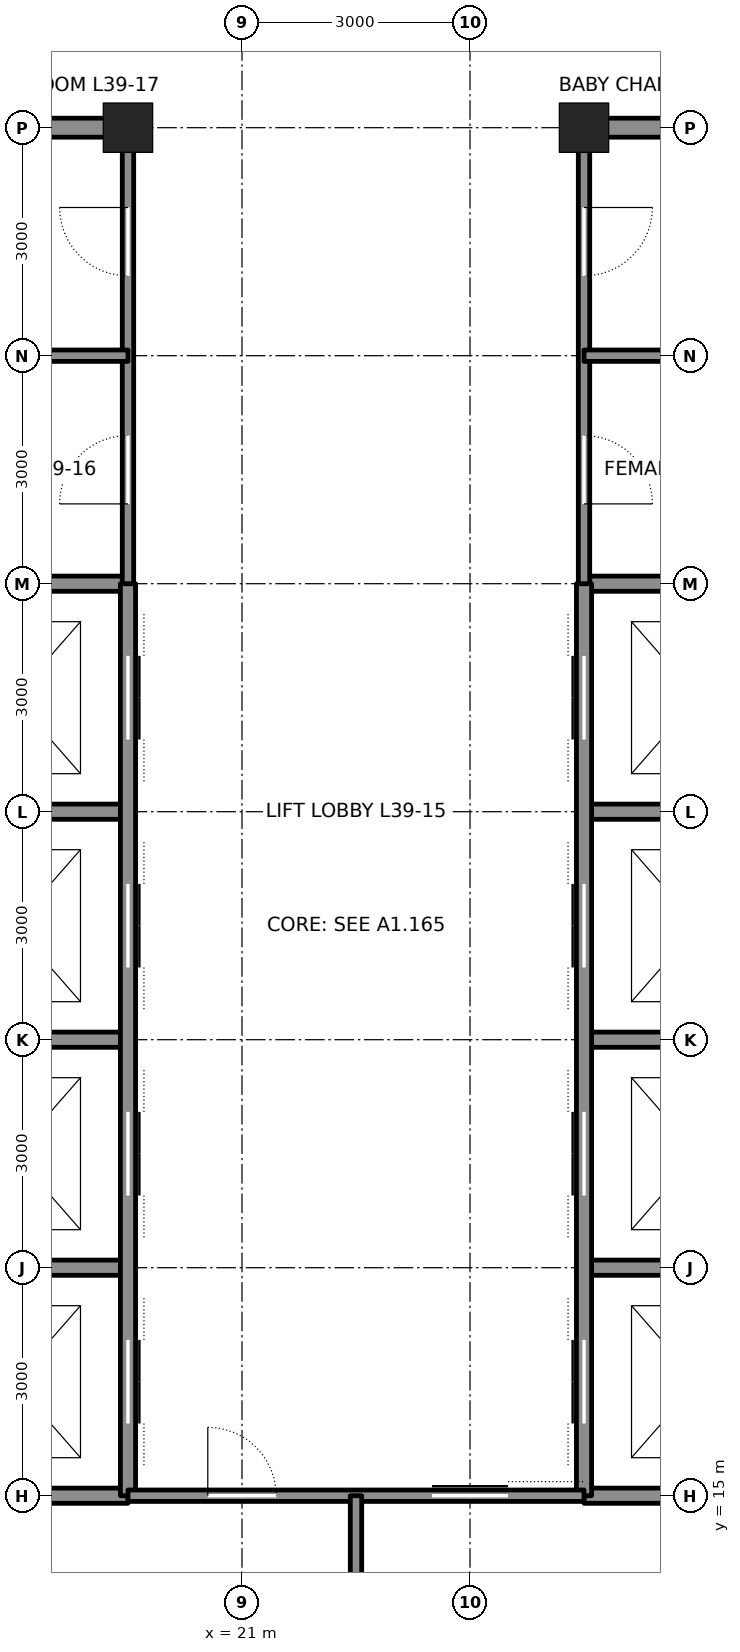
"""IFC4 building model, lengths in metres.
Left out: names, types, materials, properties, quantities, classifications, styles, units other than length and angle.
Written with IfcOpenShell. Run it as: python <this file> out.ifc"""

import sys

from ifc_helpers import new_model, si_unit, direction, frame, frame_2d, origin, origin_2d, place, context, subcontext, project, spatial, rectangle, hollow_rectangle, extrude, element, fill, save


model = new_model("IFC4")
c1 = context("Model", 3, precision=1e-05, world=origin(), true_north=direction((0.0, 1.0)))
c2 = subcontext(c1, "Body", "Model", "MODEL_VIEW")
j1 = project(units=[si_unit("LENGTHUNIT", "METRE"), si_unit("PLANEANGLEUNIT", "RADIAN")], contexts=[c1])
p1 = place(None, origin())
s1 = spatial("IfcSite", under=j1, at=p1, CompositionType="ELEMENT")
p2 = place(p1, origin())
s2 = spatial("IfcBuilding", under=s1, at=p2, CompositionType="ELEMENT")
p3 = place(p2, frame((0.0, 0.0, 180.0)))
s3 = spatial("IfcBuildingStorey", under=s2, at=p3, CompositionType="ELEMENT", Elevation=180.0)
for number, where, z_axis, x_axis in (
    (1, (19.5, 33.0, 0.0), (0.0, 0.0, 1.0), (1.0, 0.0, 0.0)),
    (2, (25.5, 33.0, 0.0), (0.0, 0.0, 1.0), (1.0, 0.0, 0.0)),
):
    element("IfcColumn", number, at=place(p3, frame(where, z_axis=z_axis, x_axis=x_axis)), inside=s3, PredefinedType="COLUMN", context=c2, shape_type="SweptSolid", body=[
        extrude(hollow_rectangle(XDim=0.65, YDim=0.65, WallThickness=0.065, at=origin_2d()), origin(), (0.0, 0.0, 1.0), 4.5),
    ])
for number, where, z_axis, x_axis in (
    (3, (12.0, 15.0, 0.0), (0.0, 0.0, 1.0), (1.0, 0.0, 0.0)),
    (4, (25.5, 15.0, 0.0), (0.0, 0.0, 1.0), (1.0, 0.0, 0.0)),
):
    element("IfcWall", number, at=place(p3, frame(where, z_axis=z_axis, x_axis=x_axis)), inside=s3, PredefinedType="SOLIDWALL", context=c2, shape_type="SweptSolid", body=[
        extrude(rectangle(XDim=7.5, YDim=0.2, at=frame_2d((3.75, 0.0))), origin(), (0.0, 0.0, 1.0), 4.34),
    ])
for number, where, z_axis, x_axis in (
    (5, (16.75, 24.0, 0.0), (0.0, 0.0, 1.0), (1.0, 0.0, 0.0)),
    (6, (25.5, 24.0, 0.0), (0.0, 0.0, 1.0), (1.0, 0.0, 0.0)),
):
    element("IfcWall", number, at=place(p3, frame(where, z_axis=z_axis, x_axis=x_axis)), inside=s3, PredefinedType="SOLIDWALL", context=c2, shape_type="SweptSolid", body=[
        extrude(rectangle(XDim=2.75, YDim=0.2, at=frame_2d((1.375, 0.0))), origin(), (0.0, 0.0, 1.0), 3.39),
    ])
p4 = place(p3, frame((12.0, 27.0, 0.0), z_axis=(0.0, 0.0, 1.0), x_axis=(1.0, 0.0, 0.0)))
e7 = element("IfcWall", 7, at=p4, inside=s3, PredefinedType="SOLIDWALL", context=c2, shape_type="SweptSolid", body=[
    extrude(rectangle(XDim=7.5, YDim=0.2, at=frame_2d((3.75, 0.0))), origin(), (0.0, 0.0, 1.0), 4.34),
])
p5 = place(p4, frame((1.65, 0.0, 0.0)))
e8 = element("IfcOpeningElement", 8, at=p5, cuts=e7, PredefinedType="OPENING", context=c2, shape_type="SweptSolid", body=[
    extrude(rectangle(XDim=1.2, YDim=2.1, at=frame_2d((0.6, 1.05))), frame((0.0, 0.11, 0.0), z_axis=(0.0, -1.0, 0.0), x_axis=(1.0, 0.0, 0.0)), (0.0, 0.0, 1.0), 0.22),
])
p6 = place(p3, frame((25.5, 27.0, 0.0), z_axis=(0.0, 0.0, 1.0), x_axis=(1.0, 0.0, 0.0)))
e9 = element("IfcWall", 9, at=p6, inside=s3, PredefinedType="SOLIDWALL", context=c2, shape_type="SweptSolid", body=[
    extrude(rectangle(XDim=3.0, YDim=0.2, at=frame_2d((1.5, 0.0))), origin(), (0.0, 0.0, 1.0), 4.34),
])
for number, where, z_axis, x_axis in (
    (10, (16.75, 33.0, 0.0), (0.0, 0.0, 1.0), (1.0, 0.0, 0.0)),
    (11, (25.75, 33.0, 0.0), (0.0, 0.0, 1.0), (1.0, 0.0, 0.0)),
):
    element("IfcWall", number, at=place(p3, frame(where, z_axis=z_axis, x_axis=x_axis)), inside=s3, PredefinedType="SOLIDWALL", context=c2, shape_type="SweptSolid", body=[
        extrude(rectangle(XDim=2.5, YDim=0.25, at=frame_2d((1.25, 0.0))), origin(), (0.0, 0.0, 1.0), 3.481),
    ])
p7 = place(p3, frame((16.5, 18.0, 0.0), z_axis=(0.0, 0.0, 1.0), x_axis=(1.0, 0.0, 0.0)))
e12 = element("IfcWall", 12, at=p7, inside=s3, PredefinedType="SOLIDWALL", context=c2, shape_type="SweptSolid", body=[
    extrude(rectangle(XDim=3.0, YDim=0.2, at=frame_2d((1.5, 0.0))), origin(), (0.0, 0.0, 1.0), 4.34),
])
p8 = place(p3, frame((25.5, 18.0, 0.0), z_axis=(0.0, 0.0, 1.0), x_axis=(1.0, 0.0, 0.0)))
e13 = element("IfcWall", 13, at=p8, inside=s3, PredefinedType="SOLIDWALL", context=c2, shape_type="SweptSolid", body=[
    extrude(rectangle(XDim=7.5, YDim=0.2, at=frame_2d((3.75, 0.0))), origin(), (0.0, 0.0, 1.0), 4.34),
])
p9 = place(p8, frame((4.65, 0.0, 0.0)))
e14 = element("IfcOpeningElement", 14, at=p9, cuts=e13, PredefinedType="OPENING", context=c2, shape_type="SweptSolid", body=[
    extrude(rectangle(XDim=1.2, YDim=2.1, at=frame_2d((0.6, 1.05))), frame((0.0, 0.11, 0.0), z_axis=(0.0, -1.0, 0.0), x_axis=(1.0, 0.0, 0.0)), (0.0, 0.0, 1.0), 0.22),
])
for number, where, z_axis, x_axis in (
    (15, (16.75, 21.0, 0.0), (0.0, 0.0, 1.0), (1.0, 0.0, 0.0)),
    (16, (25.5, 21.0, 0.0), (0.0, 0.0, 1.0), (1.0, 0.0, 0.0)),
):
    element("IfcWall", number, at=place(p3, frame(where, z_axis=z_axis, x_axis=x_axis)), inside=s3, PredefinedType="SOLIDWALL", context=c2, shape_type="SweptSolid", body=[
        extrude(rectangle(XDim=2.75, YDim=0.2, at=frame_2d((1.375, 0.0))), origin(), (0.0, 0.0, 1.0), 3.39),
    ])
p10 = place(p3, frame((19.5, 15.0, 0.0), z_axis=(0.0, 0.0, 1.0), x_axis=(0.0, 1.0, 0.0)))
e17 = element("IfcWall", 17, at=p10, inside=s3, PredefinedType="SOLIDWALL", context=c2, shape_type="SweptSolid", body=[
    extrude(rectangle(XDim=12.0, YDim=0.2, at=frame_2d((6.0, 0.0))), origin(), (0.0, 0.0, 1.0), 3.365),
])
p11 = place(p10, frame((0.95, 0.0, 0.0)))
e18 = element("IfcOpeningElement", 18, at=p11, cuts=e17, PredefinedType="OPENING", context=c2, shape_type="SweptSolid", body=[
    extrude(rectangle(XDim=1.1, YDim=2.1, at=frame_2d((0.55, 1.05))), frame((0.0, 0.11, 0.0), z_axis=(0.0, -1.0, 0.0), x_axis=(1.0, 0.0, 0.0)), (0.0, 0.0, 1.0), 0.22),
])
p12 = place(p10, frame((3.95, 0.0, 0.0)))
e19 = element("IfcOpeningElement", 19, at=p12, cuts=e17, PredefinedType="OPENING", context=c2, shape_type="SweptSolid", body=[
    extrude(rectangle(XDim=1.1, YDim=2.1, at=frame_2d((0.55, 1.05))), frame((0.0, 0.11, 0.0), z_axis=(0.0, -1.0, 0.0), x_axis=(1.0, 0.0, 0.0)), (0.0, 0.0, 1.0), 0.22),
])
p13 = place(p10, frame((6.95, 0.0, 0.0)))
e20 = element("IfcOpeningElement", 20, at=p13, cuts=e17, PredefinedType="OPENING", context=c2, shape_type="SweptSolid", body=[
    extrude(rectangle(XDim=1.1, YDim=2.1, at=frame_2d((0.55, 1.05))), frame((0.0, 0.11, 0.0), z_axis=(0.0, -1.0, 0.0), x_axis=(1.0, 0.0, 0.0)), (0.0, 0.0, 1.0), 0.22),
])
p14 = place(p10, frame((9.95, 0.0, 0.0)))
e21 = element("IfcOpeningElement", 21, at=p14, cuts=e17, PredefinedType="OPENING", context=c2, shape_type="SweptSolid", body=[
    extrude(rectangle(XDim=1.1, YDim=2.1, at=frame_2d((0.55, 1.05))), frame((0.0, 0.11, 0.0), z_axis=(0.0, -1.0, 0.0), x_axis=(1.0, 0.0, 0.0)), (0.0, 0.0, 1.0), 0.22),
])
p15 = place(p3, frame((19.5, 27.0, 0.0), z_axis=(0.0, 0.0, 1.0), x_axis=(0.0, 1.0, 0.0)))
e22 = element("IfcWall", 22, at=p15, inside=s3, PredefinedType="PARTITIONING", context=c2, shape_type="SweptSolid", body=[
    extrude(rectangle(XDim=5.75, YDim=0.15, at=frame_2d((2.875, 0.0))), origin(), (0.0, 0.0, 1.0), 3.365),
])
p16 = place(p15, frame((1.05, 0.0, 0.0)))
e23 = element("IfcOpeningElement", 23, at=p16, cuts=e22, PredefinedType="OPENING", context=c2, shape_type="SweptSolid", body=[
    extrude(rectangle(XDim=0.9, YDim=2.1, at=frame_2d((0.45, 1.05))), frame((0.0, 0.085, 0.0), z_axis=(0.0, -1.0, 0.0), x_axis=(1.0, 0.0, 0.0)), (0.0, 0.0, 1.0), 0.17),
])
p17 = place(p15, frame((4.05, 0.0, 0.0)))
e24 = element("IfcOpeningElement", 24, at=p17, cuts=e22, PredefinedType="OPENING", context=c2, shape_type="SweptSolid", body=[
    extrude(rectangle(XDim=0.9, YDim=2.1, at=frame_2d((0.45, 1.05))), frame((0.0, 0.085, 0.0), z_axis=(0.0, -1.0, 0.0), x_axis=(1.0, 0.0, 0.0)), (0.0, 0.0, 1.0), 0.17),
])
p18 = place(p3, frame((25.5, 15.0, 0.0), z_axis=(0.0, 0.0, 1.0), x_axis=(0.0, 1.0, 0.0)))
e25 = element("IfcWall", 25, at=p18, inside=s3, PredefinedType="SOLIDWALL", context=c2, shape_type="SweptSolid", body=[
    extrude(rectangle(XDim=12.0, YDim=0.2, at=frame_2d((6.0, 0.0))), origin(), (0.0, 0.0, 1.0), 3.365),
])
p19 = place(p18, frame((0.95, 0.0, 0.0)))
e26 = element("IfcOpeningElement", 26, at=p19, cuts=e25, PredefinedType="OPENING", context=c2, shape_type="SweptSolid", body=[
    extrude(rectangle(XDim=1.1, YDim=2.1, at=frame_2d((0.55, 1.05))), frame((0.0, 0.11, 0.0), z_axis=(0.0, -1.0, 0.0), x_axis=(1.0, 0.0, 0.0)), (0.0, 0.0, 1.0), 0.22),
])
p20 = place(p18, frame((3.95, 0.0, 0.0)))
e27 = element("IfcOpeningElement", 27, at=p20, cuts=e25, PredefinedType="OPENING", context=c2, shape_type="SweptSolid", body=[
    extrude(rectangle(XDim=1.1, YDim=2.1, at=frame_2d((0.55, 1.05))), frame((0.0, 0.11, 0.0), z_axis=(0.0, -1.0, 0.0), x_axis=(1.0, 0.0, 0.0)), (0.0, 0.0, 1.0), 0.22),
])
p21 = place(p18, frame((6.95, 0.0, 0.0)))
e28 = element("IfcOpeningElement", 28, at=p21, cuts=e25, PredefinedType="OPENING", context=c2, shape_type="SweptSolid", body=[
    extrude(rectangle(XDim=1.1, YDim=2.1, at=frame_2d((0.55, 1.05))), frame((0.0, 0.11, 0.0), z_axis=(0.0, -1.0, 0.0), x_axis=(1.0, 0.0, 0.0)), (0.0, 0.0, 1.0), 0.22),
])
p22 = place(p18, frame((9.95, 0.0, 0.0)))
e29 = element("IfcOpeningElement", 29, at=p22, cuts=e25, PredefinedType="OPENING", context=c2, shape_type="SweptSolid", body=[
    extrude(rectangle(XDim=1.1, YDim=2.1, at=frame_2d((0.55, 1.05))), frame((0.0, 0.11, 0.0), z_axis=(0.0, -1.0, 0.0), x_axis=(1.0, 0.0, 0.0)), (0.0, 0.0, 1.0), 0.22),
])
p23 = place(p3, frame((25.5, 27.0, 0.0), z_axis=(0.0, 0.0, 1.0), x_axis=(0.0, 1.0, 0.0)))
e30 = element("IfcWall", 30, at=p23, inside=s3, PredefinedType="PARTITIONING", context=c2, shape_type="SweptSolid", body=[
    extrude(rectangle(XDim=5.75, YDim=0.15, at=frame_2d((2.875, 0.0))), origin(), (0.0, 0.0, 1.0), 3.365),
])
p24 = place(p23, frame((1.05, 0.0, 0.0)))
e31 = element("IfcOpeningElement", 31, at=p24, cuts=e30, PredefinedType="OPENING", context=c2, shape_type="SweptSolid", body=[
    extrude(rectangle(XDim=0.9, YDim=2.1, at=frame_2d((0.45, 1.05))), frame((0.0, 0.085, 0.0), z_axis=(0.0, -1.0, 0.0), x_axis=(1.0, 0.0, 0.0)), (0.0, 0.0, 1.0), 0.17),
])
p25 = place(p23, frame((4.05, 0.0, 0.0)))
e32 = element("IfcOpeningElement", 32, at=p25, cuts=e30, PredefinedType="OPENING", context=c2, shape_type="SweptSolid", body=[
    extrude(rectangle(XDim=0.9, YDim=2.1, at=frame_2d((0.45, 1.05))), frame((0.0, 0.085, 0.0), z_axis=(0.0, -1.0, 0.0), x_axis=(1.0, 0.0, 0.0)), (0.0, 0.0, 1.0), 0.17),
])
p26 = place(p3, frame((19.5, 15.0, 0.0), z_axis=(0.0, 0.0, 1.0), x_axis=(1.0, 0.0, 0.0)))
e33 = element("IfcWall", 33, at=p26, inside=s3, PredefinedType="PARTITIONING", context=c2, shape_type="SweptSolid", body=[
    extrude(rectangle(XDim=6.0, YDim=0.15, at=frame_2d((3.0, 0.0))), origin(), (0.0, 0.0, 1.0), 4.34),
])
p27 = place(p26, frame((4.0, 0.0, 0.0)))
e34 = element("IfcOpeningElement", 34, at=p27, cuts=e33, PredefinedType="OPENING", context=c2, shape_type="SweptSolid", body=[
    extrude(rectangle(XDim=1.0, YDim=2.1, at=frame_2d((0.5, 1.05))), frame((0.0, 0.085, 0.0), z_axis=(0.0, -1.0, 0.0), x_axis=(1.0, 0.0, 0.0)), (0.0, 0.0, 1.0), 0.17),
])
p28 = place(p26, frame((1.05, 0.0, 0.0)))
e35 = element("IfcOpeningElement", 35, at=p28, cuts=e33, PredefinedType="OPENING", context=c2, shape_type="SweptSolid", body=[
    extrude(rectangle(XDim=0.9, YDim=2.1, at=frame_2d((0.45, 1.05))), frame((0.0, 0.085, 0.0), z_axis=(0.0, -1.0, 0.0), x_axis=(1.0, 0.0, 0.0)), (0.0, 0.0, 1.0), 0.17),
])
for number, where, z_axis, x_axis in (
    (36, (22.5, 15.0, 0.0), (0.0, 0.0, 1.0), (0.0, -1.0, 0.0)),
    (37, (16.5, 30.0, 0.0), (0.0, 0.0, 1.0), (1.0, 0.0, 0.0)),
    (38, (25.5, 30.0, 0.0), (0.0, 0.0, 1.0), (1.0, 0.0, 0.0)),
):
    element("IfcWall", number, at=place(p3, frame(where, z_axis=z_axis, x_axis=x_axis)), inside=s3, PredefinedType="PARTITIONING", context=c2, shape_type="SweptSolid", body=[
        extrude(rectangle(XDim=3.0, YDim=0.15, at=frame_2d((1.5, 0.0))), origin(), (0.0, 0.0, 1.0), 4.34),
    ])
p29 = place(p16, origin())
e39 = element("IfcDoor", 39, at=p29, inside=s3, OperationType="SINGLE_SWING_LEFT", PredefinedType="DOOR", context=c2, shape_type="SweptSolid", body=[
    extrude(rectangle(XDim=0.9, YDim=2.1, at=frame_2d((0.45, 1.05))), frame((0.0, 0.025, 0.0), z_axis=(0.0, -1.0, 0.0), x_axis=(1.0, 0.0, 0.0)), (0.0, 0.0, 1.0), 0.05),
])
fill(e23, e39)
p30 = place(p17, origin())
e40 = element("IfcDoor", 40, at=p30, inside=s3, OperationType="SINGLE_SWING_RIGHT", PredefinedType="DOOR", context=c2, shape_type="SweptSolid", body=[
    extrude(rectangle(XDim=0.9, YDim=2.1, at=frame_2d((0.45, 1.05))), frame((0.0, 0.025, 0.0), z_axis=(0.0, -1.0, 0.0), x_axis=(1.0, 0.0, 0.0)), (0.0, 0.0, 1.0), 0.05),
])
fill(e24, e40)
p31 = place(p24, frame((0.9, 0.0, 0.0), z_axis=(0.0, 0.0, 1.0), x_axis=(-1.0, 0.0, 0.0)))
e41 = element("IfcDoor", 41, at=p31, inside=s3, OperationType="SINGLE_SWING_RIGHT", PredefinedType="DOOR", context=c2, shape_type="SweptSolid", body=[
    extrude(rectangle(XDim=0.9, YDim=2.1, at=frame_2d((0.45, 1.05))), frame((0.0, 0.025, 0.0), z_axis=(0.0, -1.0, 0.0), x_axis=(1.0, 0.0, 0.0)), (0.0, 0.0, 1.0), 0.05),
])
fill(e31, e41)
p32 = place(p25, frame((0.9, 0.0, 0.0), z_axis=(0.0, 0.0, 1.0), x_axis=(-1.0, 0.0, 0.0)))
e42 = element("IfcDoor", 42, at=p32, inside=s3, OperationType="SINGLE_SWING_LEFT", PredefinedType="DOOR", context=c2, shape_type="SweptSolid", body=[
    extrude(rectangle(XDim=0.9, YDim=2.1, at=frame_2d((0.45, 1.05))), frame((0.0, 0.025, 0.0), z_axis=(0.0, -1.0, 0.0), x_axis=(1.0, 0.0, 0.0)), (0.0, 0.0, 1.0), 0.05),
])
fill(e32, e42)
p33 = place(p27, origin())
e43 = element("IfcDoor", 43, at=p33, inside=s3, OperationType="SLIDING_TO_LEFT", PredefinedType="DOOR", context=c2, shape_type="SweptSolid", body=[
    extrude(rectangle(XDim=1.0, YDim=2.1, at=frame_2d((0.5, 1.05))), frame((0.0, 0.025, 0.0), z_axis=(0.0, -1.0, 0.0), x_axis=(1.0, 0.0, 0.0)), (0.0, 0.0, 1.0), 0.05),
])
fill(e34, e43)
p34 = place(p28, origin())
e44 = element("IfcDoor", 44, at=p34, inside=s3, OperationType="SINGLE_SWING_LEFT", PredefinedType="DOOR", context=c2, shape_type="SweptSolid", body=[
    extrude(rectangle(XDim=0.9, YDim=2.1, at=frame_2d((0.45, 1.05))), frame((0.0, 0.025, 0.0), z_axis=(0.0, -1.0, 0.0), x_axis=(1.0, 0.0, 0.0)), (0.0, 0.0, 1.0), 0.05),
])
fill(e35, e44)
p35 = place(p11, origin())
e45 = element("IfcDoor", 45, at=p35, inside=s3, OperationType="DOUBLE_DOOR_SLIDING", PredefinedType="DOOR", context=c2, shape_type="SweptSolid", body=[
    extrude(rectangle(XDim=1.1, YDim=2.1, at=frame_2d((0.55, 1.05))), frame((0.0, 0.025, 0.0), z_axis=(0.0, -1.0, 0.0), x_axis=(1.0, 0.0, 0.0)), (0.0, 0.0, 1.0), 0.05),
])
fill(e18, e45)
p36 = place(p19, origin())
e46 = element("IfcDoor", 46, at=p36, inside=s3, OperationType="DOUBLE_DOOR_SLIDING", PredefinedType="DOOR", context=c2, shape_type="SweptSolid", body=[
    extrude(rectangle(XDim=1.1, YDim=2.1, at=frame_2d((0.55, 1.05))), frame((0.0, 0.025, 0.0), z_axis=(0.0, -1.0, 0.0), x_axis=(1.0, 0.0, 0.0)), (0.0, 0.0, 1.0), 0.05),
])
fill(e26, e46)
p37 = place(p12, origin())
e47 = element("IfcDoor", 47, at=p37, inside=s3, OperationType="DOUBLE_DOOR_SLIDING", PredefinedType="DOOR", context=c2, shape_type="SweptSolid", body=[
    extrude(rectangle(XDim=1.1, YDim=2.1, at=frame_2d((0.55, 1.05))), frame((0.0, 0.025, 0.0), z_axis=(0.0, -1.0, 0.0), x_axis=(1.0, 0.0, 0.0)), (0.0, 0.0, 1.0), 0.05),
])
fill(e19, e47)
p38 = place(p20, origin())
e48 = element("IfcDoor", 48, at=p38, inside=s3, OperationType="DOUBLE_DOOR_SLIDING", PredefinedType="DOOR", context=c2, shape_type="SweptSolid", body=[
    extrude(rectangle(XDim=1.1, YDim=2.1, at=frame_2d((0.55, 1.05))), frame((0.0, 0.025, 0.0), z_axis=(0.0, -1.0, 0.0), x_axis=(1.0, 0.0, 0.0)), (0.0, 0.0, 1.0), 0.05),
])
fill(e27, e48)
p39 = place(p13, origin())
e49 = element("IfcDoor", 49, at=p39, inside=s3, OperationType="DOUBLE_DOOR_SLIDING", PredefinedType="DOOR", context=c2, shape_type="SweptSolid", body=[
    extrude(rectangle(XDim=1.1, YDim=2.1, at=frame_2d((0.55, 1.05))), frame((0.0, 0.025, 0.0), z_axis=(0.0, -1.0, 0.0), x_axis=(1.0, 0.0, 0.0)), (0.0, 0.0, 1.0), 0.05),
])
fill(e20, e49)
p40 = place(p21, origin())
e50 = element("IfcDoor", 50, at=p40, inside=s3, OperationType="DOUBLE_DOOR_SLIDING", PredefinedType="DOOR", context=c2, shape_type="SweptSolid", body=[
    extrude(rectangle(XDim=1.1, YDim=2.1, at=frame_2d((0.55, 1.05))), frame((0.0, 0.025, 0.0), z_axis=(0.0, -1.0, 0.0), x_axis=(1.0, 0.0, 0.0)), (0.0, 0.0, 1.0), 0.05),
])
fill(e28, e50)
p41 = place(p14, origin())
e51 = element("IfcDoor", 51, at=p41, inside=s3, OperationType="DOUBLE_DOOR_SLIDING", PredefinedType="DOOR", context=c2, shape_type="SweptSolid", body=[
    extrude(rectangle(XDim=1.1, YDim=2.1, at=frame_2d((0.55, 1.05))), frame((0.0, 0.025, 0.0), z_axis=(0.0, -1.0, 0.0), x_axis=(1.0, 0.0, 0.0)), (0.0, 0.0, 1.0), 0.05),
])
fill(e21, e51)
p42 = place(p22, origin())
e52 = element("IfcDoor", 52, at=p42, inside=s3, OperationType="DOUBLE_DOOR_SLIDING", PredefinedType="DOOR", context=c2, shape_type="SweptSolid", body=[
    extrude(rectangle(XDim=1.1, YDim=2.1, at=frame_2d((0.55, 1.05))), frame((0.0, 0.025, 0.0), z_axis=(0.0, -1.0, 0.0), x_axis=(1.0, 0.0, 0.0)), (0.0, 0.0, 1.0), 0.05),
])
fill(e29, e52)
save(model, sys.argv[1])
